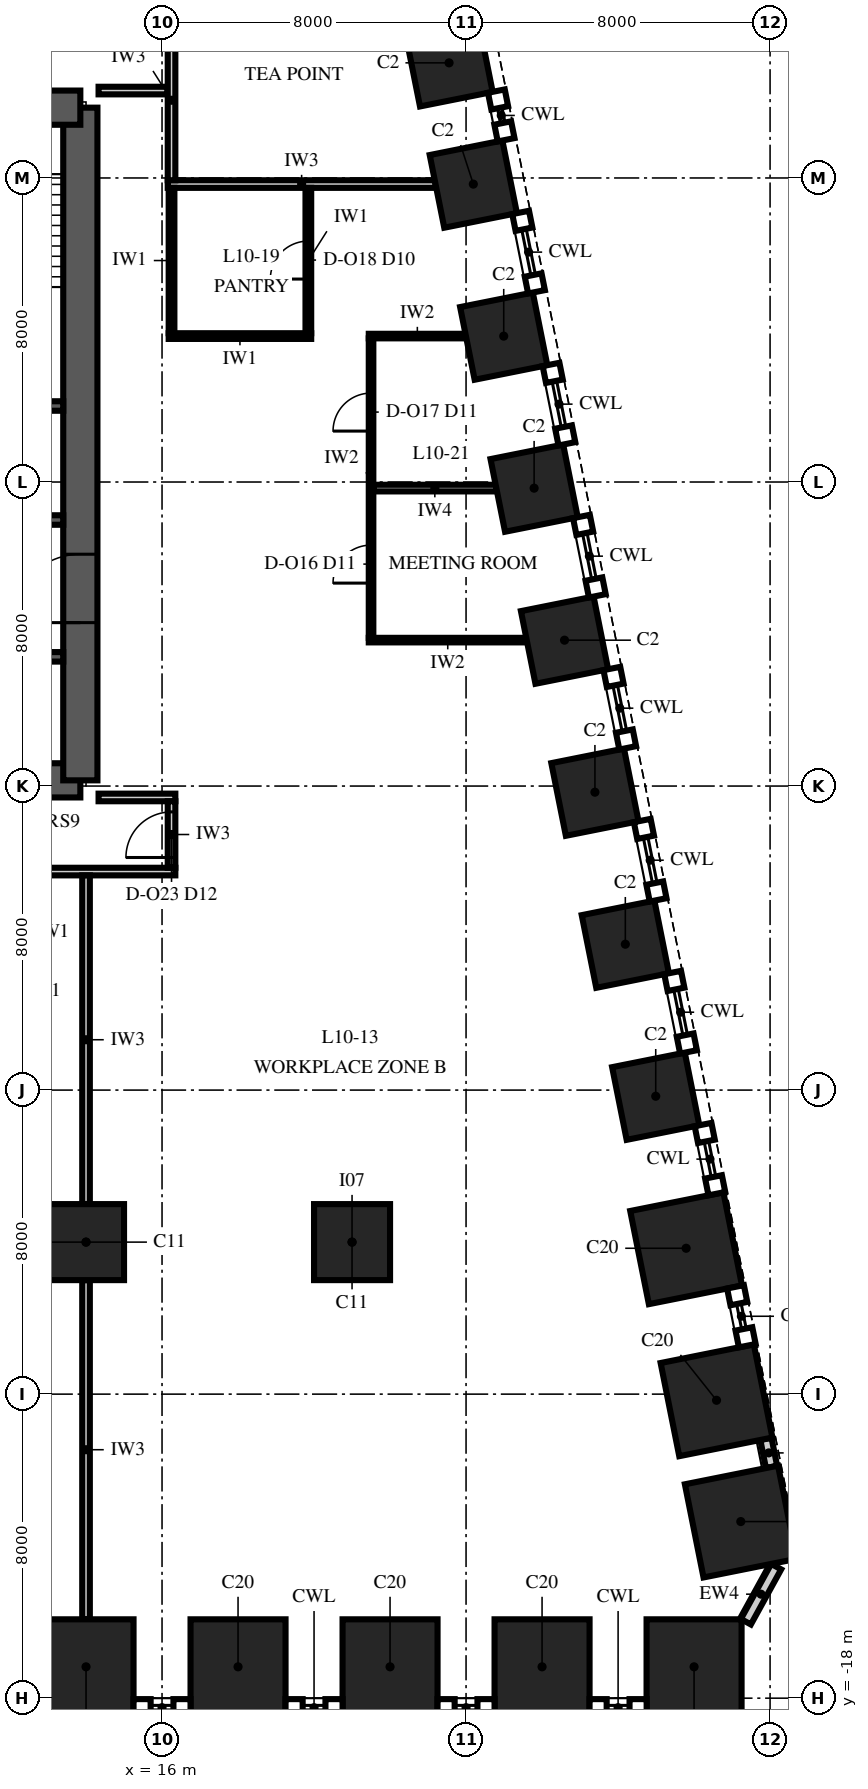
"""IFC4 building model, lengths in metres.
Left out: names, types, materials, properties, quantities, classifications, styles, units other than length and angle.
Written with IfcOpenShell. Run it as: python <this file> out.ifc"""

import sys

from ifc_helpers import new_model, si_unit, direction, frame, frame_2d, origin, origin_2d, place, context, subcontext, project, spatial, polyline, rectangle, outline, extrude, element, fill, save


model = new_model("IFC4")
c1 = context("Model", 3, precision=1e-05, world=origin(), true_north=direction((0.0, 1.0)))
c2 = subcontext(c1, "Body", "Model", "MODEL_VIEW")
j1 = project(units=[si_unit("LENGTHUNIT", "METRE"), si_unit("PLANEANGLEUNIT", "RADIAN")], contexts=[c1])
p1 = place(None, origin())
s1 = spatial("IfcSite", under=j1, at=p1, CompositionType="ELEMENT")
p2 = place(p1, origin())
s2 = spatial("IfcBuilding", under=s1, at=p2, CompositionType="ELEMENT")
p3 = place(p2, frame((0.0, 0.0, 52.0)))
s3 = spatial("IfcBuildingStorey", under=s2, at=p3, CompositionType="ELEMENT", Elevation=52.0)
for number, where, z_axis, x_axis in (
    (1, (14.0, -17.175, 0.0), (0.0, 0.0, 1.0), (1.0, 0.0, 0.0)),
    (2, (18.0, -17.175, 0.0), (0.0, 0.0, 1.0), (1.0, 0.0, 0.0)),
    (3, (22.0, -17.175, 0.0), (0.0, 0.0, 1.0), (1.0, 0.0, 0.0)),
    (4, (26.0, -17.175, 0.0), (0.0, 0.0, 1.0), (1.0, 0.0, 0.0)),
    (5, (30.0, -17.175, 0.0), (0.0, 0.0, 1.0), (1.0, 0.0, 0.0)),
    (6, (31.229, -13.353, 0.0), (0.0, 0.0, 1.0), (-0.196, 0.981, 0.0)),
    (7, (30.591, -10.162, 0.0), (0.0, 0.0, 1.0), (-0.196, 0.981, 0.0)),
    (8, (29.791, -6.162, 0.0), (0.0, 0.0, 1.0), (-0.196, 0.981, 0.0)),
):
    element("IfcColumn", number, at=place(p3, frame(where, z_axis=z_axis, x_axis=x_axis)), inside=s3, PredefinedType="COLUMN", context=c2, shape_type="SweptSolid", body=[
        extrude(rectangle(XDim=2.5, YDim=2.5, at=origin_2d()), origin(), (0.0, 0.0, 1.0), 4.0),
    ])
for number, where, z_axis, x_axis in (
    (9, (28.991, -2.162, 0.0), (0.0, 0.0, 1.0), (-0.196, 0.981, 0.0)),
    (10, (28.191, 1.838, 0.0), (0.0, 0.0, 1.0), (-0.196, 0.981, 0.0)),
    (11, (27.391, 5.838, 0.0), (0.0, 0.0, 1.0), (-0.196, 0.981, 0.0)),
    (12, (26.591, 9.838, 0.0), (0.0, 0.0, 1.0), (-0.196, 0.981, 0.0)),
    (13, (25.791, 13.838, 0.0), (0.0, 0.0, 1.0), (-0.196, 0.981, 0.0)),
    (14, (24.991, 17.838, 0.0), (0.0, 0.0, 1.0), (-0.196, 0.981, 0.0)),
    (15, (24.191, 21.838, 0.0), (0.0, 0.0, 1.0), (-0.196, 0.981, 0.0)),
    (16, (23.553, 25.029, 0.0), (0.0, 0.0, 1.0), (-0.196, 0.981, 0.0)),
):
    element("IfcColumn", number, at=place(p3, frame(where, z_axis=z_axis, x_axis=x_axis)), inside=s3, PredefinedType="COLUMN", context=c2, shape_type="SweptSolid", body=[
        extrude(rectangle(XDim=1.95, YDim=1.95, at=origin_2d()), origin(), (0.0, 0.0, 1.0), 4.0),
    ])
for number, where, z_axis, x_axis in (
    (17, (14.0, -6.0, 0.0), (0.0, 0.0, 1.0), (1.0, 0.0, 0.0)),
    (18, (21.0, -6.0, 0.0), (0.0, 0.0, 1.0), (1.0, 0.0, 0.0)),
):
    element("IfcColumn", number, at=place(p3, frame(where, z_axis=z_axis, x_axis=x_axis)), inside=s3, PredefinedType="COLUMN", context=c2, shape_type="SweptSolid", body=[
        extrude(rectangle(XDim=2.0, YDim=2.0, at=origin_2d()), origin(), (0.0, 0.0, 1.0), 4.0),
    ])
p4 = place(p3, frame((-13.85, 6.15, 0.0), z_axis=(0.0, 0.0, 1.0), x_axis=(1.0, 0.0, 0.0)))
e19 = element("IfcWall", 19, at=p4, inside=s3, PredefinedType="SHEAR", context=c2, shape_type="SweptSolid", body=[
    extrude(rectangle(XDim=27.7, YDim=0.9, at=frame_2d((13.85, 0.0))), origin(), (0.0, 0.0, 1.0), 4.0),
])
p5 = place(p3, frame((13.85, 6.15, 0.0), z_axis=(0.0, 0.0, 1.0), x_axis=(0.0, 1.0, 0.0)))
e20 = element("IfcWall", 20, at=p5, inside=s3, PredefinedType="SHEAR", context=c2, shape_type="SweptSolid", body=[
    extrude(outline(polyline([(0.0, -0.45), (17.7, -0.45), (17.7, 0.0), (17.25, 0.0), (17.25, 0.45), (0.45, 0.45), (0.45, 0.0), (0.0, 0.0), (0.0, -0.45)])), origin(), (0.0, 0.0, 1.0), 4.0),
])
p6 = place(p5, frame((4.15, 0.0, 0.0)))
e21 = element("IfcOpeningElement", 21, at=p6, cuts=e20, PredefinedType="OPENING", context=c2, shape_type="SweptSolid", body=[
    extrude(rectangle(XDim=1.8, YDim=2.4, at=frame_2d((0.9, 1.2))), frame((0.0, 0.465, 0.0), z_axis=(0.0, -1.0, 0.0), x_axis=(1.0, 0.0, 0.0)), (0.0, 0.0, 1.0), 0.93),
])
p7 = place(p3, frame((13.85, 23.85, 0.0), z_axis=(0.0, 0.0, 1.0), x_axis=(-1.0, 0.0, 0.0)))
e22 = element("IfcWall", 22, at=p7, inside=s3, PredefinedType="SHEAR", context=c2, shape_type="SweptSolid", body=[
    extrude(rectangle(XDim=27.7, YDim=0.9, at=frame_2d((13.85, 0.0))), origin(), (0.0, 0.0, 1.0), 4.0),
])
p8 = place(p7, frame((21.75, 0.0, 0.0)))
e23 = element("IfcOpeningElement", 23, at=p8, cuts=e22, PredefinedType="OPENING", context=c2, shape_type="SweptSolid", body=[
    extrude(rectangle(XDim=1.0, YDim=2.1, at=frame_2d((0.5, 1.05))), frame((0.0, 0.465, 0.0), z_axis=(0.0, -1.0, 0.0), x_axis=(1.0, 0.0, 0.0)), (0.0, 0.0, 1.0), 0.93),
])
p9 = place(p7, frame((4.95, 0.0, 0.0)))
e24 = element("IfcOpeningElement", 24, at=p9, cuts=e22, PredefinedType="OPENING", context=c2, shape_type="SweptSolid", body=[
    extrude(rectangle(XDim=1.0, YDim=2.1, at=frame_2d((0.5, 1.05))), frame((0.0, 0.465, 0.0), z_axis=(0.0, -1.0, 0.0), x_axis=(1.0, 0.0, 0.0)), (0.0, 0.0, 1.0), 0.93),
])
p10 = place(p7, frame((17.35, 0.0, 0.0)))
e25 = element("IfcOpeningElement", 25, at=p10, cuts=e22, PredefinedType="OPENING", context=c2, shape_type="SweptSolid", body=[
    extrude(rectangle(XDim=1.0, YDim=2.1, at=frame_2d((0.5, 1.05))), frame((0.0, 0.465, 0.0), z_axis=(0.0, -1.0, 0.0), x_axis=(1.0, 0.0, 0.0)), (0.0, 0.0, 1.0), 0.93),
])
p11 = place(p7, frame((13.35, 0.0, 0.0)))
e26 = element("IfcOpeningElement", 26, at=p11, cuts=e22, PredefinedType="OPENING", context=c2, shape_type="SweptSolid", body=[
    extrude(rectangle(XDim=1.0, YDim=2.1, at=frame_2d((0.5, 1.05))), frame((0.0, 0.465, 0.0), z_axis=(0.0, -1.0, 0.0), x_axis=(1.0, 0.0, 0.0)), (0.0, 0.0, 1.0), 0.93),
])
p12 = place(p7, frame((9.35, 0.0, 0.0)))
e27 = element("IfcOpeningElement", 27, at=p12, cuts=e22, PredefinedType="OPENING", context=c2, shape_type="SweptSolid", body=[
    extrude(rectangle(XDim=1.0, YDim=2.1, at=frame_2d((0.5, 1.05))), frame((0.0, 0.465, 0.0), z_axis=(0.0, -1.0, 0.0), x_axis=(1.0, 0.0, 0.0)), (0.0, 0.0, 1.0), 0.93),
])
p13 = place(p3, frame((-13.4, 9.4, 0.0), z_axis=(0.0, 0.0, 1.0), x_axis=(1.0, 0.0, 0.0)))
e28 = element("IfcWall", 28, at=p13, inside=s3, PredefinedType="SHEAR", context=c2, shape_type="SweptSolid", body=[
    extrude(rectangle(XDim=26.8, YDim=0.25, at=frame_2d((13.4, 0.0))), origin(), (0.0, 0.0, 1.0), 4.0),
])
p14 = place(p13, frame((0.25, 0.0, 0.0)))
e29 = element("IfcOpeningElement", 29, at=p14, cuts=e28, PredefinedType="OPENING", context=c2, shape_type="SweptSolid", body=[
    extrude(rectangle(XDim=1.1, YDim=2.1, at=frame_2d((0.55, 1.05))), frame((0.0, 0.14, 0.0), z_axis=(0.0, -1.0, 0.0), x_axis=(1.0, 0.0, 0.0)), (0.0, 0.0, 1.0), 0.28),
])
p15 = place(p13, frame((3.05, 0.0, 0.0)))
e30 = element("IfcOpeningElement", 30, at=p15, cuts=e28, PredefinedType="OPENING", context=c2, shape_type="SweptSolid", body=[
    extrude(rectangle(XDim=1.1, YDim=2.1, at=frame_2d((0.55, 1.05))), frame((0.0, 0.14, 0.0), z_axis=(0.0, -1.0, 0.0), x_axis=(1.0, 0.0, 0.0)), (0.0, 0.0, 1.0), 0.28),
])
p16 = place(p13, frame((5.85, 0.0, 0.0)))
e31 = element("IfcOpeningElement", 31, at=p16, cuts=e28, PredefinedType="OPENING", context=c2, shape_type="SweptSolid", body=[
    extrude(rectangle(XDim=1.1, YDim=2.1, at=frame_2d((0.55, 1.05))), frame((0.0, 0.14, 0.0), z_axis=(0.0, -1.0, 0.0), x_axis=(1.0, 0.0, 0.0)), (0.0, 0.0, 1.0), 0.28),
])
p17 = place(p3, frame((-13.4, 13.0, 0.0), z_axis=(0.0, 0.0, 1.0), x_axis=(1.0, 0.0, 0.0)))
e32 = element("IfcWall", 32, at=p17, inside=s3, PredefinedType="SHEAR", context=c2, shape_type="SweptSolid", body=[
    extrude(rectangle(XDim=26.8, YDim=0.25, at=frame_2d((13.4, 0.0))), origin(), (0.0, 0.0, 1.0), 4.0),
])
p18 = place(p17, frame((0.25, 0.0, 0.0)))
e33 = element("IfcOpeningElement", 33, at=p18, cuts=e32, PredefinedType="OPENING", context=c2, shape_type="SweptSolid", body=[
    extrude(rectangle(XDim=1.1, YDim=2.1, at=frame_2d((0.55, 1.05))), frame((0.0, 0.14, 0.0), z_axis=(0.0, -1.0, 0.0), x_axis=(1.0, 0.0, 0.0)), (0.0, 0.0, 1.0), 0.28),
])
p19 = place(p17, frame((8.65, 0.0, 0.0)))
e34 = element("IfcOpeningElement", 34, at=p19, cuts=e32, PredefinedType="OPENING", context=c2, shape_type="SweptSolid", body=[
    extrude(rectangle(XDim=1.1, YDim=2.1, at=frame_2d((0.55, 1.05))), frame((0.0, 0.14, 0.0), z_axis=(0.0, -1.0, 0.0), x_axis=(1.0, 0.0, 0.0)), (0.0, 0.0, 1.0), 0.28),
])
p20 = place(p17, frame((12.05, 0.0, 0.0)))
e35 = element("IfcOpeningElement", 35, at=p20, cuts=e32, PredefinedType="OPENING", context=c2, shape_type="SweptSolid", body=[
    extrude(rectangle(XDim=1.1, YDim=2.1, at=frame_2d((0.55, 1.05))), frame((0.0, 0.14, 0.0), z_axis=(0.0, -1.0, 0.0), x_axis=(1.0, 0.0, 0.0)), (0.0, 0.0, 1.0), 0.28),
])
p21 = place(p17, frame((15.25, 0.0, 0.0)))
e36 = element("IfcOpeningElement", 36, at=p21, cuts=e32, PredefinedType="OPENING", context=c2, shape_type="SweptSolid", body=[
    extrude(rectangle(XDim=0.9, YDim=2.1, at=frame_2d((0.45, 1.05))), frame((0.0, 0.14, 0.0), z_axis=(0.0, -1.0, 0.0), x_axis=(1.0, 0.0, 0.0)), (0.0, 0.0, 1.0), 0.28),
])
p22 = place(p17, frame((17.65, 0.0, 0.0)))
e37 = element("IfcOpeningElement", 37, at=p22, cuts=e32, PredefinedType="OPENING", context=c2, shape_type="SweptSolid", body=[
    extrude(rectangle(XDim=0.9, YDim=2.1, at=frame_2d((0.45, 1.05))), frame((0.0, 0.14, 0.0), z_axis=(0.0, -1.0, 0.0), x_axis=(1.0, 0.0, 0.0)), (0.0, 0.0, 1.0), 0.28),
])
p23 = place(p3, frame((-13.4, 16.0, 0.0), z_axis=(0.0, 0.0, 1.0), x_axis=(1.0, 0.0, 0.0)))
e38 = element("IfcWall", 38, at=p23, inside=s3, PredefinedType="SHEAR", context=c2, shape_type="SweptSolid", body=[
    extrude(rectangle(XDim=26.8, YDim=0.25, at=frame_2d((13.4, 0.0))), origin(), (0.0, 0.0, 1.0), 4.0),
])
p24 = place(p3, frame((31.363, -15.988, 0.0), z_axis=(0.0, 0.0, 1.0), x_axis=(0.481879089964, 0.876237720402, 0.0)))
e39 = element("IfcWall", 39, at=p24, inside=s3, PredefinedType="SOLIDWALL", context=c2, shape_type="SweptSolid", body=[
    extrude(rectangle(XDim=1.654, YDim=0.3, at=frame_2d((0.827, 0.0))), origin(), (0.0, 0.0, 1.0), 4.0),
])
p25 = place(p3, frame((32.038, -11.916, 0.0), z_axis=(0.0, 0.0, 1.0), x_axis=(-0.195867092459, 0.980630451338, 0.0)))
e40 = element("IfcWall", 40, at=p25, inside=s3, PredefinedType="SOLIDWALL", context=c2, shape_type="SweptSolid", body=[
    extrude(rectangle(XDim=0.754, YDim=0.3, at=frame_2d((0.377, 0.0))), origin(), (0.0, 0.0, 1.0), 4.0),
])
p26 = place(p3, frame((-16.35, 3.75, 0.0), z_axis=(0.0, 0.0, 1.0), x_axis=(1.0, 0.0, 0.0)))
e41 = element("IfcWall", 41, at=p26, inside=s3, PredefinedType="PARTITIONING", context=c2, shape_type="SweptSolid", body=[
    extrude(rectangle(XDim=32.7, YDim=0.2, at=frame_2d((16.35, 0.0))), origin(), (0.0, 0.0, 1.0), 3.25),
])
p27 = place(p26, frame((15.75, 0.0, 0.0)))
e42 = element("IfcOpeningElement", 42, at=p27, cuts=e41, PredefinedType="OPENING", context=c2, shape_type="SweptSolid", body=[
    extrude(rectangle(XDim=1.2, YDim=2.4, at=frame_2d((0.6, 1.2))), frame((0.0, 0.115, 0.0), z_axis=(0.0, -1.0, 0.0), x_axis=(1.0, 0.0, 0.0)), (0.0, 0.0, 1.0), 0.23),
])
p28 = place(p3, frame((14.33, 5.7, 0.0), z_axis=(0.0, 0.0, 1.0), x_axis=(1.0, 0.0, 0.0)))
e43 = element("IfcWall", 43, at=p28, inside=s3, PredefinedType="PARTITIONING", context=c2, shape_type="SweptSolid", body=[
    extrude(rectangle(XDim=2.02, YDim=0.2, at=frame_2d((1.01, 0.0))), origin(), (0.0, 0.0, 1.0), 3.85),
])
p29 = place(p3, frame((21.44, 9.84, 0.0), z_axis=(0.0, 0.0, 1.0), x_axis=(1.0, 0.0, 0.0)))
e44 = element("IfcWall", 44, at=p29, inside=s3, PredefinedType="PARTITIONING", context=c2, shape_type="SweptSolid", body=[
    extrude(rectangle(XDim=4.156, YDim=0.12, at=frame_2d((2.078, 0.0))), origin(), (0.0, 0.0, 1.0), 3.25),
])
p30 = place(p3, frame((21.56, 13.84, 0.0), z_axis=(0.0, 0.0, 1.0), x_axis=(1.0, 0.0, 0.0)))
e45 = element("IfcWall", 45, at=p30, inside=s3, PredefinedType="PARTITIONING", context=c2, shape_type="SweptSolid", body=[
    extrude(rectangle(XDim=3.236, YDim=0.175, at=frame_2d((1.618, 0.0))), origin(), (0.0, 0.0, 1.0), 3.25),
])
p31 = place(p3, frame((16.175, 17.84, 0.0), z_axis=(0.0, 0.0, 1.0), x_axis=(1.0, 0.0, 0.0)))
e46 = element("IfcWall", 46, at=p31, inside=s3, PredefinedType="PARTITIONING", context=c2, shape_type="SweptSolid", body=[
    extrude(rectangle(XDim=3.75, YDim=0.15, at=frame_2d((1.875, 0.0))), origin(), (0.0, 0.0, 1.0), 3.25),
])
p32 = place(p3, frame((21.44, 17.84, 0.0), z_axis=(0.0, 0.0, 1.0), x_axis=(1.0, 0.0, 0.0)))
e47 = element("IfcWall", 47, at=p32, inside=s3, PredefinedType="PARTITIONING", context=c2, shape_type="SweptSolid", body=[
    extrude(rectangle(XDim=2.556, YDim=0.12, at=frame_2d((1.278, 0.0))), origin(), (0.0, 0.0, 1.0), 3.25),
])
p33 = place(p3, frame((16.15, 21.84, 0.0), z_axis=(0.0, 0.0, 1.0), x_axis=(1.0, 0.0, 0.0)))
e48 = element("IfcWall", 48, at=p33, inside=s3, PredefinedType="PARTITIONING", context=c2, shape_type="SweptSolid", body=[
    extrude(rectangle(XDim=7.046, YDim=0.2, at=frame_2d((3.523, 0.0))), origin(), (0.0, 0.0, 1.0), 3.25),
])
p34 = place(p3, frame((14.33, 24.3, 0.0), z_axis=(0.0, 0.0, 1.0), x_axis=(1.0, 0.0, 0.0)))
e49 = element("IfcWall", 49, at=p34, inside=s3, PredefinedType="PARTITIONING", context=c2, shape_type="SweptSolid", body=[
    extrude(rectangle(XDim=1.82, YDim=0.2, at=frame_2d((0.91, 0.0))), origin(), (0.0, 0.0, 1.0), 3.4),
])
p35 = place(p3, frame((14.0, -15.925, 0.0), z_axis=(0.0, 0.0, 1.0), x_axis=(0.0, 1.0, 0.0)))
e50 = element("IfcWall", 50, at=p35, inside=s3, PredefinedType="PARTITIONING", context=c2, shape_type="SweptSolid", body=[
    extrude(rectangle(XDim=8.925, YDim=0.2, at=frame_2d((4.462, 0.0))), origin(), (0.0, 0.0, 1.0), 3.25),
])
p36 = place(p3, frame((14.0, -5.0, 0.0), z_axis=(0.0, 0.0, 1.0), x_axis=(0.0, 1.0, 0.0)))
e51 = element("IfcWall", 51, at=p36, inside=s3, PredefinedType="PARTITIONING", context=c2, shape_type="SweptSolid", body=[
    extrude(rectangle(XDim=8.65, YDim=0.2, at=frame_2d((4.325, 0.0))), origin(), (0.0, 0.0, 1.0), 3.25),
])
p37 = place(p3, frame((16.25, 3.85, 0.0), z_axis=(0.0, 0.0, 1.0), x_axis=(0.0, 1.0, 0.0)))
e52 = element("IfcWall", 52, at=p37, inside=s3, PredefinedType="PARTITIONING", context=c2, shape_type="SweptSolid", body=[
    extrude(rectangle(XDim=1.75, YDim=0.2, at=frame_2d((0.875, 0.0))), origin(), (0.0, 0.0, 1.0), 3.85),
])
p38 = place(p37, frame((0.27, 0.0, 0.0)))
e53 = element("IfcOpeningElement", 53, at=p38, cuts=e52, PredefinedType="OPENING", context=c2, shape_type="SweptSolid", body=[
    extrude(rectangle(XDim=1.2, YDim=2.4, at=frame_2d((0.6, 1.2))), frame((0.0, 0.115, 0.0), z_axis=(0.0, -1.0, 0.0), x_axis=(1.0, 0.0, 0.0)), (0.0, 0.0, 1.0), 0.23),
])
p39 = place(p3, frame((16.25, 17.915, 0.0), z_axis=(0.0, 0.0, 1.0), x_axis=(0.0, 1.0, 0.0)))
e54 = element("IfcWall", 54, at=p39, inside=s3, PredefinedType="PARTITIONING", context=c2, shape_type="SweptSolid", body=[
    extrude(rectangle(XDim=3.825, YDim=0.15, at=frame_2d((1.913, 0.0))), origin(), (0.0, 0.0, 1.0), 3.25),
])
p40 = place(p3, frame((16.25, 21.94, 0.0), z_axis=(0.0, 0.0, 1.0), x_axis=(0.0, 1.0, 0.0)))
e55 = element("IfcWall", 55, at=p40, inside=s3, PredefinedType="PARTITIONING", context=c2, shape_type="SweptSolid", body=[
    extrude(rectangle(XDim=4.21, YDim=0.2, at=frame_2d((2.105, 0.0))), origin(), (0.0, 0.0, 1.0), 3.4),
])
p41 = place(p3, frame((19.85, 17.915, 0.0), z_axis=(0.0, 0.0, 1.0), x_axis=(0.0, 1.0, 0.0)))
e56 = element("IfcWall", 56, at=p41, inside=s3, PredefinedType="PARTITIONING", context=c2, shape_type="SweptSolid", body=[
    extrude(rectangle(XDim=3.825, YDim=0.15, at=frame_2d((1.913, 0.0))), origin(), (0.0, 0.0, 1.0), 3.25),
])
p42 = place(p41, frame((1.425, 0.0, 0.0)))
e57 = element("IfcOpeningElement", 57, at=p42, cuts=e56, PredefinedType="OPENING", context=c2, shape_type="SweptSolid", body=[
    extrude(rectangle(XDim=1.0, YDim=2.3, at=frame_2d((0.5, 1.15))), frame((0.0, 0.09, 0.0), z_axis=(0.0, -1.0, 0.0), x_axis=(1.0, 0.0, 0.0)), (0.0, 0.0, 1.0), 0.18),
])
p43 = place(p3, frame((21.5, 9.9, 0.0), z_axis=(0.0, 0.0, 1.0), x_axis=(0.0, 1.0, 0.0)))
e58 = element("IfcWall", 58, at=p43, inside=s3, PredefinedType="PARTITIONING", context=c2, shape_type="SweptSolid", body=[
    extrude(rectangle(XDim=7.88, YDim=0.12, at=frame_2d((3.94, 0.0))), origin(), (0.0, 0.0, 1.0), 3.25),
])
p44 = place(p43, frame((1.44, 0.0, 0.0)))
e59 = element("IfcOpeningElement", 59, at=p44, cuts=e58, PredefinedType="OPENING", context=c2, shape_type="SweptSolid", body=[
    extrude(rectangle(XDim=1.0, YDim=2.4, at=frame_2d((0.5, 1.2))), frame((0.0, 0.075, 0.0), z_axis=(0.0, -1.0, 0.0), x_axis=(1.0, 0.0, 0.0)), (0.0, 0.0, 1.0), 0.15),
])
p45 = place(p43, frame((5.44, 0.0, 0.0)))
e60 = element("IfcOpeningElement", 60, at=p45, cuts=e58, PredefinedType="OPENING", context=c2, shape_type="SweptSolid", body=[
    extrude(rectangle(XDim=1.0, YDim=2.4, at=frame_2d((0.5, 1.2))), frame((0.0, 0.075, 0.0), z_axis=(0.0, -1.0, 0.0), x_axis=(1.0, 0.0, 0.0)), (0.0, 0.0, 1.0), 0.15),
])
p46 = place(p6, origin())
e61 = element("IfcDoor", 61, at=p46, inside=s3, OperationType="DOUBLE_DOOR_SINGLE_SWING", PredefinedType="DOOR", context=c2, shape_type="SweptSolid", body=[
    extrude(rectangle(XDim=1.8, YDim=2.4, at=frame_2d((0.9, 1.2))), frame((0.0, 0.45, 0.0), z_axis=(0.0, -1.0, 0.0), x_axis=(1.0, 0.0, 0.0)), (0.0, 0.0, 1.0), 0.899),
])
fill(e21, e61)
p47 = place(p44, origin())
e62 = element("IfcDoor", 62, at=p47, inside=s3, OperationType="SINGLE_SWING_RIGHT", PredefinedType="DOOR", context=c2, shape_type="SweptSolid", body=[
    extrude(rectangle(XDim=1.0, YDim=2.4, at=frame_2d((0.5, 1.2))), frame((0.0, 0.06, 0.0), z_axis=(0.0, -1.0, 0.0), x_axis=(1.0, 0.0, 0.0)), (0.0, 0.0, 1.0), 0.12),
])
fill(e59, e62)
p48 = place(p45, origin())
e63 = element("IfcDoor", 63, at=p48, inside=s3, OperationType="SINGLE_SWING_RIGHT", PredefinedType="DOOR", context=c2, shape_type="SweptSolid", body=[
    extrude(rectangle(XDim=1.0, YDim=2.4, at=frame_2d((0.5, 1.2))), frame((0.0, 0.06, 0.0), z_axis=(0.0, -1.0, 0.0), x_axis=(1.0, 0.0, 0.0)), (0.0, 0.0, 1.0), 0.12),
])
fill(e60, e63)
p49 = place(p42, origin())
e64 = element("IfcDoor", 64, at=p49, inside=s3, OperationType="SINGLE_SWING_LEFT", PredefinedType="DOOR", context=c2, shape_type="SweptSolid", body=[
    extrude(rectangle(XDim=1.0, YDim=2.3, at=frame_2d((0.5, 1.15))), frame((0.0, 0.075, 0.0), z_axis=(0.0, -1.0, 0.0), x_axis=(1.0, 0.0, 0.0)), (0.0, 0.0, 1.0), 0.149),
])
fill(e57, e64)
p50 = place(p38, origin())
e65 = element("IfcDoor", 65, at=p50, inside=s3, OperationType="SINGLE_SWING_LEFT", PredefinedType="DOOR", context=c2, shape_type="SweptSolid", body=[
    extrude(rectangle(XDim=1.2, YDim=2.4, at=frame_2d((0.6, 1.2))), frame((0.0, 0.1, 0.0), z_axis=(0.0, -1.0, 0.0), x_axis=(1.0, 0.0, 0.0)), (0.0, 0.0, 1.0), 0.199),
])
fill(e53, e65)
save(model, sys.argv[1])
